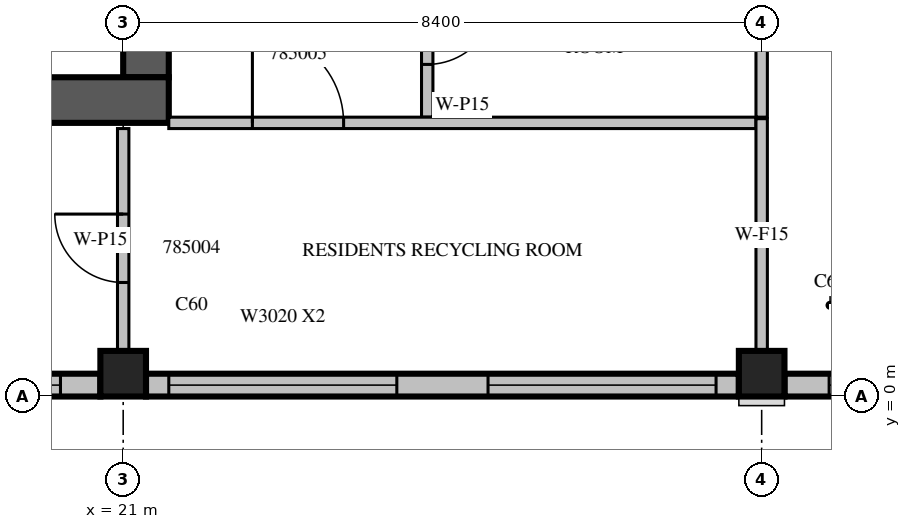
"""IFC4 building model, lengths in metres.
Left out: names, types, materials, properties, quantities, classifications, styles, units other than length and angle.
Written with IfcOpenShell. Run it as: python <this file> out.ifc"""

import sys

from ifc_helpers import new_model, si_unit, direction, frame, frame_2d, origin, origin_2d, place, context, subcontext, project, spatial, rectangle, extrude, source, transform, mapped, element, fill, save


model = new_model("IFC4")
c1 = context("Model", 3, precision=1e-05, world=origin(), true_north=direction((0.0, 1.0)))
c2 = subcontext(c1, "Body", "Model", "MODEL_VIEW")
j1 = project(units=[si_unit("LENGTHUNIT", "METRE"), si_unit("PLANEANGLEUNIT", "RADIAN")], contexts=[c1])
p1 = place(None, origin())
s1 = spatial("IfcSite", under=j1, at=p1, CompositionType="ELEMENT")
p2 = place(p1, origin())
s2 = spatial("IfcBuilding", under=s1, at=p2, CompositionType="ELEMENT")
p3 = place(p2, frame((0.0, 0.0, 358.0)))
s3 = spatial("IfcBuildingStorey", under=s2, at=p3, CompositionType="ELEMENT", Elevation=358.0)
m1 = source(origin(), c2, "Body", "SweptSolid", [
    extrude(rectangle(XDim=0.6, YDim=0.6, at=origin_2d()), origin(), (0.0, 0.0, 1.0), 3.5),
])
for number, where, z_axis, x_axis in (
    (1, (21.0, 0.3, 0.0), (0.0, 0.0, 1.0), (1.0, 0.0, 0.0)),
    (2, (29.4, 0.3, 0.0), (0.0, 0.0, 1.0), (1.0, 0.0, 0.0)),
):
    element("IfcColumn", number, at=place(p3, frame(where, z_axis=z_axis, x_axis=x_axis)), inside=s3, PredefinedType="COLUMN", context=c2, shape_type="MappedRepresentation", body=[
        mapped(m1, transform((0.0, 0.0, 0.0), scale=1.0)),
    ])
m2 = source(origin(), c2, "Body", "SweptSolid", [
    extrude(rectangle(XDim=6.3, YDim=0.6, at=frame_2d((3.15, 0.0))), origin(), (0.0, 0.0, 1.0), 3.5),
])
p4 = place(p3, frame((21.3, 4.2, 0.0), z_axis=(0.0, 0.0, 1.0), x_axis=(0.0, 1.0, 0.0)))
e3 = element("IfcWall", 3, at=p4, inside=s3, PredefinedType="SHEAR", context=c2, shape_type="MappedRepresentation", body=[
    mapped(m2, transform((0.0, 0.0, 0.0), scale=1.0)),
])
m3 = source(origin(), c2, "Body", "SweptSolid", [
    extrude(rectangle(XDim=2.2, YDim=2.1, at=frame_2d((1.1, 1.05))), frame((0.0, 0.31, 0.0), z_axis=(0.0, -1.0, 0.0), x_axis=(1.0, 0.0, 0.0)), (0.0, 0.0, 1.0), 0.62),
])
p5 = place(p4, frame((4.0, 0.0, 0.0)))
e4 = element("IfcOpeningElement", 4, at=p5, cuts=e3, PredefinedType="OPENING", context=c2, shape_type="MappedRepresentation", body=[
    mapped(m3, transform((0.0, 0.0, 0.0), scale=1.0)),
])
m4 = source(origin(), c2, "Body", "SweptSolid", [
    extrude(rectangle(XDim=17.4, YDim=0.6, at=frame_2d((8.7, 0.0))), origin(), (0.0, 0.0, 1.0), 3.5),
])
p6 = place(p3, frame((4.2, 3.9, 0.0), z_axis=(0.0, 0.0, 1.0), x_axis=(1.0, 0.0, 0.0)))
e5 = element("IfcWall", 5, at=p6, inside=s3, PredefinedType="SHEAR", context=c2, shape_type="MappedRepresentation", body=[
    mapped(m4, transform((0.0, 0.0, 0.0), scale=1.0)),
])
m5 = source(origin(), c2, "Body", "SweptSolid", [
    extrude(rectangle(XDim=0.9, YDim=2.1, at=frame_2d((0.45, 1.05))), frame((0.0, 0.31, 0.0), z_axis=(0.0, -1.0, 0.0), x_axis=(1.0, 0.0, 0.0)), (0.0, 0.0, 1.0), 0.62),
])
p7 = place(p6, frame((14.0, 0.0, 0.0)))
e6 = element("IfcOpeningElement", 6, at=p7, cuts=e5, PredefinedType="OPENING", context=c2, shape_type="MappedRepresentation", body=[
    mapped(m5, transform((0.0, 0.0, 0.0), scale=1.0)),
])
m6 = source(origin(), c2, "Body", "SweptSolid", [
    extrude(rectangle(XDim=9.9, YDim=0.3, at=frame_2d((4.95, 0.0))), origin(), (0.0, 0.0, 1.0), 3.1),
])
p8 = place(p3, frame((10.8, 0.15, 0.0), z_axis=(0.0, 0.0, 1.0), x_axis=(1.0, 0.0, 0.0)))
e7 = element("IfcWall", 7, at=p8, inside=s3, PredefinedType="STANDARD", context=c2, shape_type="MappedRepresentation", body=[
    mapped(m6, transform((0.0, 0.0, 0.0), scale=1.0)),
])
m7 = source(origin(), c2, "Body", "SweptSolid", [
    extrude(rectangle(XDim=1.8, YDim=2.0, at=frame_2d((0.9, 1.0))), frame((0.0, 0.16, 0.0), z_axis=(0.0, -1.0, 0.0), x_axis=(1.0, 0.0, 0.0)), (0.0, 0.0, 1.0), 0.32),
])
p9 = place(p8, frame((2.15, 0.0, 0.6)))
e8 = element("IfcOpeningElement", 8, at=p9, cuts=e7, PredefinedType="OPENING", context=c2, shape_type="MappedRepresentation", body=[
    mapped(m7, transform((0.0, 0.0, 0.0), scale=1.0)),
])
m8 = source(origin(), c2, "Body", "SweptSolid", [
    extrude(rectangle(XDim=3.6, YDim=2.0, at=frame_2d((1.8, 1.0))), frame((0.0, 0.16, 0.0), z_axis=(0.0, -1.0, 0.0), x_axis=(1.0, 0.0, 0.0)), (0.0, 0.0, 1.0), 0.32),
])
p10 = place(p8, frame((5.775, 0.0, 0.6)))
e9 = element("IfcOpeningElement", 9, at=p10, cuts=e7, PredefinedType="OPENING", context=c2, shape_type="MappedRepresentation", body=[
    mapped(m8, transform((0.0, 0.0, 0.0), scale=1.0)),
])
m9 = source(origin(), c2, "Body", "SweptSolid", [
    extrude(rectangle(XDim=7.8, YDim=0.3, at=frame_2d((3.9, 0.0))), origin(), (0.0, 0.0, 1.0), 3.1),
])
p11 = place(p3, frame((21.3, 0.15, 0.0), z_axis=(0.0, 0.0, 1.0), x_axis=(1.0, 0.0, 0.0)))
e10 = element("IfcWall", 10, at=p11, inside=s3, PredefinedType="STANDARD", context=c2, shape_type="MappedRepresentation", body=[
    mapped(m9, transform((0.0, 0.0, 0.0), scale=1.0)),
])
m10 = source(origin(), c2, "Body", "SweptSolid", [
    extrude(rectangle(XDim=3.0, YDim=2.0, at=frame_2d((1.5, 1.0))), frame((0.0, 0.16, 0.0), z_axis=(0.0, -1.0, 0.0), x_axis=(1.0, 0.0, 0.0)), (0.0, 0.0, 1.0), 0.32),
])
p12 = place(p11, frame((0.3, 0.0, 0.6)))
e11 = element("IfcOpeningElement", 11, at=p12, cuts=e10, PredefinedType="OPENING", context=c2, shape_type="MappedRepresentation", body=[
    mapped(m10, transform((0.0, 0.0, 0.0), scale=1.0)),
])
p13 = place(p11, frame((4.5, 0.0, 0.6)))
e12 = element("IfcOpeningElement", 12, at=p13, cuts=e10, PredefinedType="OPENING", context=c2, shape_type="MappedRepresentation", body=[
    mapped(m10, transform((0.0, 0.0, 0.0), scale=1.0)),
])
p14 = place(p3, frame((29.7, 0.15, 0.0), z_axis=(0.0, 0.0, 1.0), x_axis=(1.0, 0.0, 0.0)))
e13 = element("IfcWall", 13, at=p14, inside=s3, PredefinedType="STANDARD", context=c2, shape_type="MappedRepresentation", body=[
    mapped(m9, transform((0.0, 0.0, 0.0), scale=1.0)),
])
m11 = source(origin(), c2, "Body", "SweptSolid", [
    extrude(rectangle(XDim=1.2, YDim=2.0, at=frame_2d((0.6, 1.0))), frame((0.0, 0.16, 0.0), z_axis=(0.0, -1.0, 0.0), x_axis=(1.0, 0.0, 0.0)), (0.0, 0.0, 1.0), 0.32),
])
p15 = place(p14, frame((0.588, 0.0, 0.6)))
e14 = element("IfcOpeningElement", 14, at=p15, cuts=e13, PredefinedType="OPENING", context=c2, shape_type="MappedRepresentation", body=[
    mapped(m11, transform((0.0, 0.0, 0.0), scale=1.0)),
])
p16 = place(p14, frame((6.112, 0.0, 0.6)))
e15 = element("IfcOpeningElement", 15, at=p16, cuts=e13, PredefinedType="OPENING", context=c2, shape_type="MappedRepresentation", body=[
    mapped(m11, transform((0.0, 0.0, 0.0), scale=1.0)),
])
m12 = source(origin(), c2, "Body", "SweptSolid", [
    extrude(rectangle(XDim=2.4, YDim=2.0, at=frame_2d((1.2, 1.0))), frame((0.0, 0.16, 0.0), z_axis=(0.0, -1.0, 0.0), x_axis=(1.0, 0.0, 0.0)), (0.0, 0.0, 1.0), 0.32),
])
p17 = place(p14, frame((2.75, 0.0, 0.6)))
e16 = element("IfcOpeningElement", 16, at=p17, cuts=e13, PredefinedType="OPENING", context=c2, shape_type="MappedRepresentation", body=[
    mapped(m12, transform((0.0, 0.0, 0.0), scale=1.0)),
])
m13 = source(origin(), c2, "Body", "SweptSolid", [
    extrude(rectangle(XDim=4.575, YDim=0.15, at=frame_2d((2.288, 0.0))), origin(), (0.0, 0.0, 1.0), 3.1),
])
p18 = place(p3, frame((25.0, 8.25, 0.0), z_axis=(0.0, 0.0, 1.0), x_axis=(0.0, -1.0, 0.0)))
e17 = element("IfcWall", 17, at=p18, inside=s3, PredefinedType="PARTITIONING", context=c2, shape_type="MappedRepresentation", body=[
    mapped(m13, transform((0.0, 0.0, 0.0), scale=1.0)),
])
m14 = source(origin(), c2, "Body", "SweptSolid", [
    extrude(rectangle(XDim=0.9, YDim=2.1, at=frame_2d((0.45, 1.05))), frame((0.0, 0.085, 0.0), z_axis=(0.0, -1.0, 0.0), x_axis=(1.0, 0.0, 0.0)), (0.0, 0.0, 1.0), 0.17),
])
p19 = place(p18, frame((2.981, 0.0, 0.0)))
e18 = element("IfcOpeningElement", 18, at=p19, cuts=e17, PredefinedType="OPENING", context=c2, shape_type="MappedRepresentation", body=[
    mapped(m14, transform((0.0, 0.0, 0.0), scale=1.0)),
])
p20 = place(p3, frame((29.4, 3.675, 0.0), z_axis=(0.0, 0.0, 1.0), x_axis=(0.0, 1.0, 0.0)))
e19 = element("IfcWall", 19, at=p20, inside=s3, PredefinedType="PARTITIONING", context=c2, shape_type="MappedRepresentation", body=[
    mapped(m13, transform((0.0, 0.0, 0.0), scale=1.0)),
])
p21 = place(p3, frame((21.0, 3.525, 0.0), z_axis=(0.0, 0.0, 1.0), x_axis=(0.0, -1.0, 0.0)))
e20 = element("IfcWall", 20, at=p21, inside=s3, PredefinedType="PARTITIONING", context=c2, shape_type="SweptSolid", body=[
    extrude(rectangle(XDim=2.926, YDim=0.15, at=frame_2d((1.463, 0.0))), origin(), (0.0, 0.0, 1.0), 3.1),
])
p22 = place(p21, frame((1.125, 0.0, 0.0)))
e21 = element("IfcOpeningElement", 21, at=p22, cuts=e20, PredefinedType="OPENING", context=c2, shape_type="MappedRepresentation", body=[
    mapped(m14, transform((0.0, 0.0, 0.0), scale=1.0)),
])
m15 = source(origin(), c2, "Body", "SweptSolid", [
    extrude(rectangle(XDim=7.725, YDim=0.15, at=frame_2d((3.862, 0.0))), origin(), (0.0, 0.0, 1.0), 3.1),
])
p23 = place(p3, frame((21.6, 3.6, 0.0), z_axis=(0.0, 0.0, 1.0), x_axis=(1.0, 0.0, 0.0)))
e22 = element("IfcWall", 22, at=p23, inside=s3, PredefinedType="PARTITIONING", context=c2, shape_type="MappedRepresentation", body=[
    mapped(m15, transform((0.0, 0.0, 0.0), scale=1.0)),
])
m16 = source(origin(), c2, "Body", "SweptSolid", [
    extrude(rectangle(XDim=1.2, YDim=2.1, at=frame_2d((0.6, 1.05))), frame((0.0, 0.085, 0.0), z_axis=(0.0, -1.0, 0.0), x_axis=(1.0, 0.0, 0.0)), (0.0, 0.0, 1.0), 0.17),
])
p24 = place(p23, frame((1.1, 0.0, 0.0)))
e23 = element("IfcOpeningElement", 23, at=p24, cuts=e22, PredefinedType="OPENING", context=c2, shape_type="MappedRepresentation", body=[
    mapped(m16, transform((0.0, 0.0, 0.0), scale=1.0)),
])
m17 = source(origin(), c2, "Body", "SweptSolid", [
    extrude(rectangle(XDim=3.056, YDim=0.15, at=frame_2d((1.528, 0.0))), origin(), (0.0, 0.0, 1.0), 3.1),
])
p25 = place(p3, frame((29.4, 0.599, 0.0), z_axis=(0.0, 0.0, 1.0), x_axis=(0.0, 1.0, 0.0)))
e24 = element("IfcWall", 24, at=p25, inside=s3, PredefinedType="PARTITIONING", context=c2, shape_type="MappedRepresentation", body=[
    mapped(m17, transform((0.0, 0.0, 0.0), scale=1.0)),
])
m18 = source(origin(), c2, "Body", "SweptSolid", [
    extrude(rectangle(XDim=3.6, YDim=2.0, at=frame_2d((1.8, 1.0))), frame((0.0, 0.03, 0.0), z_axis=(0.0, -1.0, 0.0), x_axis=(1.0, 0.0, 0.0)), (0.0, 0.0, 1.0), 0.06),
])
p26 = place(p10, origin())
e25 = element("IfcWindow", 25, at=p26, inside=s3, PartitioningType="SINGLE_PANEL", PredefinedType="WINDOW", context=c2, shape_type="MappedRepresentation", body=[
    mapped(m18, transform((0.0, 0.0, 0.0), scale=1.0)),
])
fill(e9, e25)
m19 = source(origin(), c2, "Body", "SweptSolid", [
    extrude(rectangle(XDim=3.0, YDim=2.0, at=frame_2d((1.5, 1.0))), frame((0.0, 0.03, 0.0), z_axis=(0.0, -1.0, 0.0), x_axis=(1.0, 0.0, 0.0)), (0.0, 0.0, 1.0), 0.06),
])
p27 = place(p12, origin())
e26 = element("IfcWindow", 26, at=p27, inside=s3, PartitioningType="SINGLE_PANEL", PredefinedType="WINDOW", context=c2, shape_type="MappedRepresentation", body=[
    mapped(m19, transform((0.0, 0.0, 0.0), scale=1.0)),
])
fill(e11, e26)
p28 = place(p13, origin())
e27 = element("IfcWindow", 27, at=p28, inside=s3, PartitioningType="SINGLE_PANEL", PredefinedType="WINDOW", context=c2, shape_type="MappedRepresentation", body=[
    mapped(m19, transform((0.0, 0.0, 0.0), scale=1.0)),
])
fill(e12, e27)
m20 = source(origin(), c2, "Body", "SweptSolid", [
    extrude(rectangle(XDim=1.2, YDim=2.0, at=frame_2d((0.6, 1.0))), frame((0.0, 0.03, 0.0), z_axis=(0.0, -1.0, 0.0), x_axis=(1.0, 0.0, 0.0)), (0.0, 0.0, 1.0), 0.06),
])
p29 = place(p15, origin())
e28 = element("IfcWindow", 28, at=p29, inside=s3, PartitioningType="SINGLE_PANEL", PredefinedType="WINDOW", context=c2, shape_type="MappedRepresentation", body=[
    mapped(m20, transform((0.0, 0.0, 0.0), scale=1.0)),
])
fill(e14, e28)
m21 = source(origin(), c2, "Body", "SweptSolid", [
    extrude(rectangle(XDim=0.9, YDim=2.1, at=frame_2d((0.45, 1.05))), frame((0.0, 0.025, 0.0), z_axis=(0.0, -1.0, 0.0), x_axis=(1.0, 0.0, 0.0)), (0.0, 0.0, 1.0), 0.05),
])
p30 = place(p19, origin())
e29 = element("IfcDoor", 29, at=p30, inside=s3, OperationType="SINGLE_SWING_LEFT", PredefinedType="DOOR", context=c2, shape_type="MappedRepresentation", body=[
    mapped(m21, transform((0.0, 0.0, 0.0), scale=1.0)),
])
fill(e18, e29)
p31 = place(p22, origin())
e30 = element("IfcDoor", 30, at=p31, inside=s3, OperationType="SINGLE_SWING_RIGHT", PredefinedType="DOOR", context=c2, shape_type="MappedRepresentation", body=[
    mapped(m21, transform((0.0, 0.0, 0.0), scale=1.0)),
])
fill(e21, e30)
m22 = source(origin(), c2, "Body", "SweptSolid", [
    extrude(rectangle(XDim=1.2, YDim=2.1, at=frame_2d((0.6, 1.05))), frame((0.0, 0.025, 0.0), z_axis=(0.0, -1.0, 0.0), x_axis=(1.0, 0.0, 0.0)), (0.0, 0.0, 1.0), 0.05),
])
p32 = place(p24, origin())
e31 = element("IfcDoor", 31, at=p32, inside=s3, OperationType="SINGLE_SWING_LEFT", PredefinedType="DOOR", context=c2, shape_type="MappedRepresentation", body=[
    mapped(m22, transform((0.0, 0.0, 0.0), scale=1.0)),
])
fill(e23, e31)
save(model, sys.argv[1])
